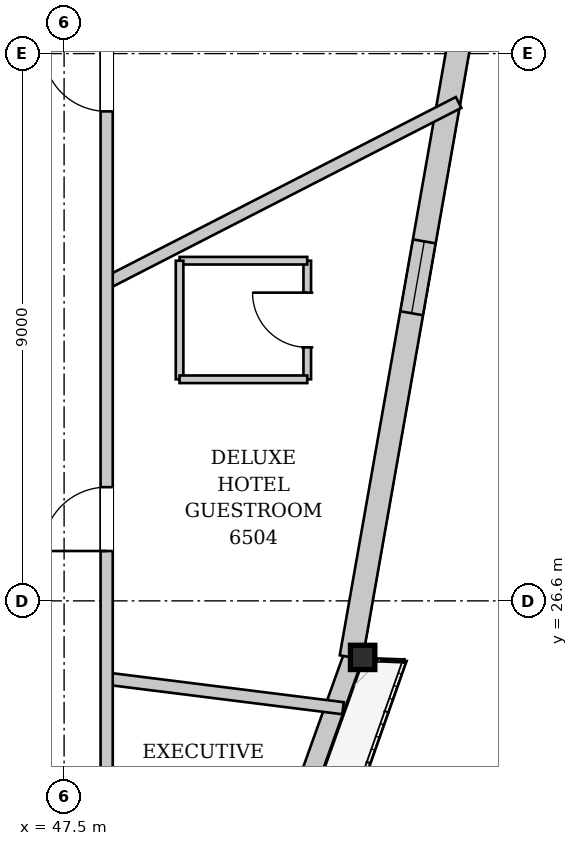
"""IFC4 building model, lengths in metres.
Left out: names, types, materials, properties, quantities, classifications, styles, units other than length and angle.
Written with IfcOpenShell. Run it as: python <this file> out.ifc"""

import sys

from ifc_helpers import new_model, si_unit, direction, frame, frame_2d, origin, origin_2d, place, context, subcontext, project, spatial, rectangle, i_section, extrude, source, transform, mapped, element, fill, save


model = new_model("IFC4")
c1 = context("Model", 3, precision=1e-05, world=origin(), true_north=direction((0.0, 1.0)))
c2 = subcontext(c1, "Body", "Model", "MODEL_VIEW")
j1 = project(units=[si_unit("LENGTHUNIT", "METRE"), si_unit("PLANEANGLEUNIT", "RADIAN")], contexts=[c1])
p1 = place(None, origin())
s1 = spatial("IfcSite", under=j1, at=p1, CompositionType="ELEMENT")
p2 = place(p1, origin())
s2 = spatial("IfcBuilding", under=s1, at=p2, CompositionType="ELEMENT")
p3 = place(p2, frame((0.0, 0.0, 245.3)))
s3 = spatial("IfcBuildingStorey", under=s2, at=p3, CompositionType="ELEMENT", Elevation=245.3)
m1 = source(origin(), c2, "Body", "SweptSolid", [
    extrude(i_section(OverallWidth=0.401, OverallDepth=0.399, WebThickness=0.022, FlangeThickness=0.034, at=origin_2d()), origin(), (0.0, 0.0, 1.0), 3.436),
])
p4 = place(p3, frame((52.408, 25.639, 0.0), z_axis=(0.001208042101, 0.018262754122, 0.999832492194), x_axis=(-0.997819383739, 0.066003616823, 0.0)))
e1 = element("IfcColumn", 1, at=p4, inside=s3, PredefinedType="COLUMN", context=c2, shape_type="MappedRepresentation", body=[
    mapped(m1, transform((0.0, 0.0, 0.0), x_axis=(1.0, 0.0, 0.0), y_axis=(0.0, 1.0, 0.0), z_axis=(0.0, 0.0, 1.0), scale=1.0)),
])
p5 = place(p3, frame((52.257, 25.693, 0.0), z_axis=(0.0, 0.0, 1.0), x_axis=(-0.337512626034, -0.941321001183, 0.0)))
e2 = element("IfcWall", 2, at=p5, inside=s3, PredefinedType="SOLIDWALL", context=c2, shape_type="SweptSolid", body=[
    extrude(rectangle(XDim=22.663, YDim=0.32, at=frame_2d((11.332, 0.0))), origin(), (0.0, 0.0, 1.0), 2.872),
])
p6 = place(p5, frame((6.502, 0.0, 0.0)))
e3 = element("IfcOpeningElement", 3, at=p6, cuts=e2, PredefinedType="OPENING", context=c2, shape_type="SweptSolid", body=[
    extrude(rectangle(XDim=1.5, YDim=2.3, at=frame_2d((0.75, 1.15))), frame((0.0, 0.17, 0.0), z_axis=(0.0, -1.0, 0.0), x_axis=(1.0, 0.0, 0.0)), (0.0, 0.0, 1.0), 0.34),
])
p7 = place(p5, frame((15.471, 0.0, 0.402)))
e4 = element("IfcOpeningElement", 4, at=p7, cuts=e2, PredefinedType="OPENING", context=c2, shape_type="SweptSolid", body=[
    extrude(rectangle(XDim=2.6, YDim=2.35, at=frame_2d((1.3, 1.175))), frame((0.0, 0.17, 0.0), z_axis=(0.0, -1.0, 0.0), x_axis=(1.0, 0.0, 0.0)), (0.0, 0.0, 1.0), 0.34),
])
p8 = place(p3, frame((56.146, 47.992, 0.0), z_axis=(0.0, 0.0, 1.0), x_axis=(-0.173221161048, -0.984882952114, 0.0)))
e5 = element("IfcWall", 5, at=p8, inside=s3, PredefinedType="SOLIDWALL", context=c2, shape_type="SweptSolid", body=[
    extrude(rectangle(XDim=22.663, YDim=0.38, at=frame_2d((11.332, 0.0))), origin(), (0.0, 0.0, 1.0), 2.872),
])
p9 = place(p8, frame((5.746, 0.0, 0.65)))
e6 = element("IfcOpeningElement", 6, at=p9, cuts=e5, PredefinedType="OPENING", context=c2, shape_type="SweptSolid", body=[
    extrude(rectangle(XDim=1.2, YDim=1.5, at=frame_2d((0.6, 0.75))), frame((0.0, 0.2, 0.0), z_axis=(0.0, -1.0, 0.0), x_axis=(1.0, 0.0, 0.0)), (0.0, 0.0, 1.0), 0.4),
])
p10 = place(p8, frame((15.718, 0.0, 0.65)))
e7 = element("IfcOpeningElement", 7, at=p10, cuts=e5, PredefinedType="OPENING", context=c2, shape_type="SweptSolid", body=[
    extrude(rectangle(XDim=1.2, YDim=1.5, at=frame_2d((0.6, 0.75))), frame((0.0, 0.2, 0.0), z_axis=(0.0, -1.0, 0.0), x_axis=(1.0, 0.0, 0.0)), (0.0, 0.0, 1.0), 0.4),
])
p11 = place(p3, frame((48.2, 25.322, 0.0), z_axis=(0.0, 0.0, 1.0), x_axis=(0.992243327494, -0.124310816274, 0.0)))
e8 = element("IfcWall", 8, at=p11, inside=s3, PredefinedType="PARTITIONING", context=c2, shape_type="SweptSolid", body=[
    extrude(rectangle(XDim=3.918, YDim=0.2, at=frame_2d((1.959, 0.0))), origin(), (0.0, 0.0, 1.0), 3.38),
])
p12 = place(p3, frame((48.2, 31.829, 0.0), z_axis=(0.0, 0.0, 1.0), x_axis=(0.889862398015, 0.456229013324, 0.0)))
e9 = element("IfcWall", 9, at=p12, inside=s3, PredefinedType="PARTITIONING", context=c2, shape_type="SweptSolid", body=[
    extrude(rectangle(XDim=6.504, YDim=0.2, at=frame_2d((3.252, 0.0))), origin(), (0.0, 0.0, 1.0), 3.38),
])
p13 = place(p3, frame((42.112, 34.15, 0.0), z_axis=(0.0, 0.0, 1.0), x_axis=(0.478252978847, 0.878222117817, 0.0)))
e10 = element("IfcWall", 10, at=p13, inside=s3, PredefinedType="PARTITIONING", context=c2, shape_type="SweptSolid", body=[
    extrude(rectangle(XDim=14.82, YDim=0.2, at=frame_2d((7.41, 0.0))), origin(), (0.0, 0.0, 1.0), 3.38),
])
p14 = place(p3, frame((51.499, 30.244, 0.0), z_axis=(0.0, 0.0, 1.0), x_axis=(0.0, 1.0, 0.0)))
e11 = element("IfcWall", 11, at=p14, inside=s3, PredefinedType="PARTITIONING", context=c2, shape_type="SweptSolid", body=[
    extrude(rectangle(XDim=1.95, YDim=0.125, at=frame_2d((0.975, 0.0))), origin(), (0.0, 0.0, 1.0), 3.38),
])
p15 = place(p14, frame((0.525, 0.0, 0.0)))
e12 = element("IfcOpeningElement", 12, at=p15, cuts=e11, PredefinedType="OPENING", context=c2, shape_type="SweptSolid", body=[
    extrude(rectangle(XDim=0.9, YDim=2.1, at=frame_2d((0.45, 1.05))), frame((0.0, 0.073, 0.0), z_axis=(0.0, -1.0, 0.0), x_axis=(1.0, 0.0, 0.0)), (0.0, 0.0, 1.0), 0.145),
])
p16 = place(p3, frame((51.499, 32.194, 0.0), z_axis=(0.0, 0.0, 1.0), x_axis=(-1.0, 0.0, 0.0)))
e13 = element("IfcWall", 13, at=p16, inside=s3, PredefinedType="PARTITIONING", context=c2, shape_type="SweptSolid", body=[
    extrude(rectangle(XDim=2.1, YDim=0.125, at=frame_2d((1.05, 0.0))), origin(), (0.0, 0.0, 1.0), 3.38),
])
p17 = place(p3, frame((49.399, 32.194, 0.0), z_axis=(0.0, 0.0, 1.0), x_axis=(0.0, -1.0, 0.0)))
e14 = element("IfcWall", 14, at=p17, inside=s3, PredefinedType="PARTITIONING", context=c2, shape_type="SweptSolid", body=[
    extrude(rectangle(XDim=1.95, YDim=0.125, at=frame_2d((0.975, 0.0))), origin(), (0.0, 0.0, 1.0), 3.38),
])
p18 = place(p3, frame((49.399, 30.244, 0.0), z_axis=(0.0, 0.0, 1.0), x_axis=(1.0, 0.0, 0.0)))
e15 = element("IfcWall", 15, at=p18, inside=s3, PredefinedType="PARTITIONING", context=c2, shape_type="SweptSolid", body=[
    extrude(rectangle(XDim=2.1, YDim=0.125, at=frame_2d((1.05, 0.0))), origin(), (0.0, 0.0, 1.0), 3.38),
])
p19 = place(p3, frame((48.2, 17.2, 0.0), z_axis=(0.0, 0.0, 1.0), x_axis=(0.0, 1.0, 0.0)))
e16 = element("IfcWall", 16, at=p19, inside=s3, PredefinedType="PARTITIONING", context=c2, shape_type="SweptSolid", body=[
    extrude(rectangle(XDim=18.8, YDim=0.2, at=frame_2d((9.4, 0.0))), origin(), (0.0, 0.0, 1.0), 3.065),
])
p20 = place(p19, frame((3.467, 0.0, 0.0)))
e17 = element("IfcOpeningElement", 17, at=p20, cuts=e16, PredefinedType="OPENING", context=c2, shape_type="SweptSolid", body=[
    extrude(rectangle(XDim=1.05, YDim=2.2, at=frame_2d((0.525, 1.1))), frame((0.0, 0.11, 0.0), z_axis=(0.0, -1.0, 0.0), x_axis=(1.0, 0.0, 0.0)), (0.0, 0.0, 1.0), 0.22),
])
p21 = place(p19, frame((10.22, 0.0, 0.0)))
e18 = element("IfcOpeningElement", 18, at=p21, cuts=e16, PredefinedType="OPENING", context=c2, shape_type="SweptSolid", body=[
    extrude(rectangle(XDim=1.05, YDim=2.2, at=frame_2d((0.525, 1.1))), frame((0.0, 0.11, 0.0), z_axis=(0.0, -1.0, 0.0), x_axis=(1.0, 0.0, 0.0)), (0.0, 0.0, 1.0), 0.22),
])
p22 = place(p19, frame((17.45, 0.0, 0.0)))
e19 = element("IfcOpeningElement", 19, at=p22, cuts=e16, PredefinedType="OPENING", context=c2, shape_type="SweptSolid", body=[
    extrude(rectangle(XDim=1.05, YDim=2.2, at=frame_2d((0.525, 1.1))), frame((0.0, 0.11, 0.0), z_axis=(0.0, -1.0, 0.0), x_axis=(1.0, 0.0, 0.0)), (0.0, 0.0, 1.0), 0.22),
])
m2 = source(origin(), c2, "Body", "SweptSolid", [
    extrude(rectangle(XDim=1.2, YDim=1.5, at=frame_2d((0.6, 0.75))), frame((0.0, 0.03, 0.0), z_axis=(0.0, -1.0, 0.0), x_axis=(1.0, 0.0, 0.0)), (0.0, 0.0, 1.0), 0.06),
])
p23 = place(p10, origin())
e20 = element("IfcWindow", 20, at=p23, inside=s3, PartitioningType="SINGLE_PANEL", PredefinedType="WINDOW", context=c2, shape_type="MappedRepresentation", body=[
    mapped(m2, transform((0.0, 0.0, 0.0), x_axis=(1.0, 0.0, 0.0), y_axis=(0.0, 1.0, 0.0), z_axis=(0.0, 0.0, 1.0), scale=1.0)),
])
fill(e7, e20)
m3 = source(origin(), c2, "Body", "SweptSolid", [
    extrude(rectangle(XDim=0.9, YDim=2.1, at=frame_2d((0.45, 1.05))), frame((0.0, 0.025, 0.0), z_axis=(0.0, -1.0, 0.0), x_axis=(1.0, 0.0, 0.0)), (0.0, 0.0, 1.0), 0.05),
])
p24 = place(p15, origin())
e21 = element("IfcDoor", 21, at=p24, inside=s3, OperationType="SINGLE_SWING_RIGHT", PredefinedType="DOOR", context=c2, shape_type="MappedRepresentation", body=[
    mapped(m3, transform((0.0, 0.0, 0.0), x_axis=(1.0, 0.0, 0.0), y_axis=(0.0, 1.0, 0.0), z_axis=(0.0, 0.0, 1.0), scale=1.0)),
])
fill(e12, e21)
m4 = source(origin(), c2, "Body", "SweptSolid", [
    extrude(rectangle(XDim=1.05, YDim=2.2, at=frame_2d((0.525, 1.1))), frame((0.0, 0.025, 0.0), z_axis=(0.0, -1.0, 0.0), x_axis=(1.0, 0.0, 0.0)), (0.0, 0.0, 1.0), 0.05),
])
p25 = place(p21, origin())
e22 = element("IfcDoor", 22, at=p25, inside=s3, OperationType="SINGLE_SWING_LEFT", PredefinedType="DOOR", context=c2, shape_type="MappedRepresentation", body=[
    mapped(m4, transform((0.0, 0.0, 0.0), x_axis=(1.0, 0.0, 0.0), y_axis=(0.0, 1.0, 0.0), z_axis=(0.0, 0.0, 1.0), scale=1.0)),
])
fill(e18, e22)
p26 = place(p22, origin())
e23 = element("IfcDoor", 23, at=p26, inside=s3, OperationType="SINGLE_SWING_RIGHT", PredefinedType="DOOR", context=c2, shape_type="MappedRepresentation", body=[
    mapped(m4, transform((0.0, 0.0, 0.0), x_axis=(1.0, 0.0, 0.0), y_axis=(0.0, 1.0, 0.0), z_axis=(0.0, 0.0, 1.0), scale=1.0)),
])
fill(e19, e23)
save(model, sys.argv[1])
